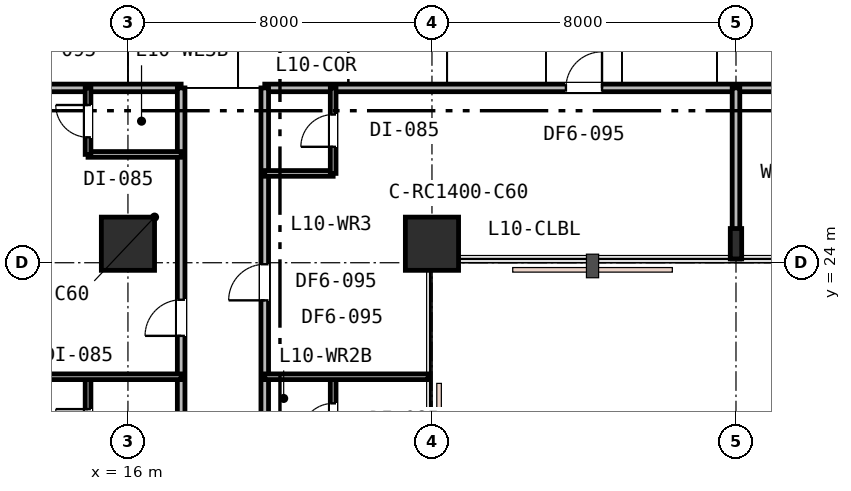
"""IFC4 building model, lengths in metres.
Left out: names, types, materials, properties, quantities, classifications, styles, units other than length and angle.
Written with IfcOpenShell. Run it as: python <this file> out.ifc"""

import sys

from ifc_helpers import new_model, si_unit, direction, frame, frame_2d, origin, origin_2d, place, context, subcontext, project, spatial, rectangle, i_section, extrude, element, fill, save


model = new_model("IFC4")
c1 = context("Model", 3, precision=1e-05, world=origin(), true_north=direction((0.0, 1.0)))
c2 = subcontext(c1, "Body", "Model", "MODEL_VIEW")
j1 = project(units=[si_unit("LENGTHUNIT", "METRE"), si_unit("PLANEANGLEUNIT", "RADIAN")], contexts=[c1])
p1 = place(None, origin())
s1 = spatial("IfcSite", under=j1, at=p1, CompositionType="ELEMENT")
p2 = place(p1, origin())
s2 = spatial("IfcBuilding", under=s1, at=p2, CompositionType="ELEMENT")
p3 = place(p2, frame((0.0, 0.0, 43.8)))
s3 = spatial("IfcBuildingStorey", under=s2, at=p3, CompositionType="ELEMENT", Elevation=43.8)
for number, where, z_axis, x_axis in (
    (1, (16.0, 24.5, 0.0), (0.0, 0.0, 1.0), (1.0, 0.0, 0.0)),
    (2, (24.0, 24.5, 0.0), (0.0, 0.0, 1.0), (1.0, 0.0, 0.0)),
):
    element("IfcColumn", number, at=place(p3, frame(where, z_axis=z_axis, x_axis=x_axis)), inside=s3, PredefinedType="COLUMN", context=c2, shape_type="SweptSolid", body=[
        extrude(rectangle(XDim=1.4, YDim=1.4, at=origin_2d()), origin(), (0.0, 0.0, 1.0), 3.6),
    ])
p4 = place(p3, frame((32.0, 24.5, 0.0), z_axis=(0.0, 0.0, 1.0), x_axis=(1.0, 0.0, 0.0)))
e3 = element("IfcColumn", 3, at=p4, inside=s3, PredefinedType="COLUMN", context=c2, shape_type="SweptSolid", body=[
    extrude(i_section(OverallWidth=0.3, OverallDepth=0.8, WebThickness=0.018, FlangeThickness=0.033, FilletRadius=0.03, at=origin_2d()), origin(), (0.0, 0.0, 1.0), 3.6),
])
p5 = place(p3, frame((0.1, 28.6, 0.0), z_axis=(0.0, 0.0, 1.0), x_axis=(1.0, 0.0, 0.0)))
e4 = element("IfcWall", 4, at=p5, inside=s3, PredefinedType="PARTITIONING", context=c2, shape_type="SweptSolid", body=[
    extrude(rectangle(XDim=17.3, YDim=0.2, at=frame_2d((8.65, 0.0))), origin(), (0.0, 0.0, 1.0), 2.82),
])
p6 = place(p3, frame((19.6, 28.6, 0.0), z_axis=(0.0, 0.0, 1.0), x_axis=(1.0, 0.0, 0.0)))
e5 = element("IfcWall", 5, at=p6, inside=s3, PredefinedType="PARTITIONING", context=c2, shape_type="SweptSolid", body=[
    extrude(rectangle(XDim=30.8, YDim=0.2, at=frame_2d((15.4, 0.0))), origin(), (0.0, 0.0, 1.0), 2.82),
])
p7 = place(p6, frame((7.925, 0.0, 0.0)))
e6 = element("IfcOpeningElement", 6, at=p7, cuts=e5, PredefinedType="OPENING", context=c2, shape_type="SweptSolid", body=[
    extrude(rectangle(XDim=0.95, YDim=2.15, at=frame_2d((0.475, 1.075))), frame((0.0, 0.11, 0.0), z_axis=(0.0, -1.0, 0.0), x_axis=(1.0, 0.0, 0.0)), (0.0, 0.0, 1.0), 0.22),
])
p8 = place(p6, frame((16.39, 0.0, 0.0)))
e7 = element("IfcOpeningElement", 7, at=p8, cuts=e5, PredefinedType="OPENING", context=c2, shape_type="SweptSolid", body=[
    extrude(rectangle(XDim=0.95, YDim=2.15, at=frame_2d((0.475, 1.075))), frame((0.0, 0.11, 0.0), z_axis=(0.0, -1.0, 0.0), x_axis=(1.0, 0.0, 0.0)), (0.0, 0.0, 1.0), 0.22),
])
p9 = place(p6, frame((26.835, 0.0, 0.0)))
e8 = element("IfcOpeningElement", 8, at=p9, cuts=e5, PredefinedType="OPENING", context=c2, shape_type="SweptSolid", body=[
    extrude(rectangle(XDim=0.95, YDim=2.15, at=frame_2d((0.475, 1.075))), frame((0.0, 0.11, 0.0), z_axis=(0.0, -1.0, 0.0), x_axis=(1.0, 0.0, 0.0)), (0.0, 0.0, 1.0), 0.22),
])
p10 = place(p3, frame((32.0, 24.1, 0.0), z_axis=(0.0, 0.0, 1.0), x_axis=(0.0, 1.0, 0.0)))
e9 = element("IfcWall", 9, at=p10, inside=s3, PredefinedType="PARTITIONING", context=c2, shape_type="SweptSolid", body=[
    extrude(rectangle(XDim=4.5, YDim=0.2, at=frame_2d((2.25, 0.0))), origin(), (0.0, 0.0, 1.0), 2.93),
])
p11 = place(p3, frame((17.4, 5.6, 0.0), z_axis=(0.0, 0.0, 1.0), x_axis=(0.0, 1.0, 0.0)))
e10 = element("IfcWall", 10, at=p11, inside=s3, PredefinedType="PARTITIONING", context=c2, shape_type="SweptSolid", body=[
    extrude(rectangle(XDim=23.0, YDim=0.2, at=frame_2d((11.5, 0.0))), origin(), (0.0, 0.0, 1.0), 2.82),
])
p12 = place(p11, frame((0.84, 0.0, 0.0)))
e11 = element("IfcOpeningElement", 11, at=p12, cuts=e10, PredefinedType="OPENING", context=c2, shape_type="SweptSolid", body=[
    extrude(rectangle(XDim=0.95, YDim=2.15, at=frame_2d((0.475, 1.075))), frame((0.0, 0.11, 0.0), z_axis=(0.0, -1.0, 0.0), x_axis=(1.0, 0.0, 0.0)), (0.0, 0.0, 1.0), 0.22),
])
p13 = place(p11, frame((8.983, 0.0, 0.0)))
e12 = element("IfcOpeningElement", 12, at=p13, cuts=e10, PredefinedType="OPENING", context=c2, shape_type="SweptSolid", body=[
    extrude(rectangle(XDim=0.95, YDim=2.15, at=frame_2d((0.475, 1.075))), frame((0.0, 0.11, 0.0), z_axis=(0.0, -1.0, 0.0), x_axis=(1.0, 0.0, 0.0)), (0.0, 0.0, 1.0), 0.22),
])
p14 = place(p11, frame((16.476, 0.0, 0.0)))
e13 = element("IfcOpeningElement", 13, at=p14, cuts=e10, PredefinedType="OPENING", context=c2, shape_type="SweptSolid", body=[
    extrude(rectangle(XDim=0.95, YDim=2.15, at=frame_2d((0.475, 1.075))), frame((0.0, 0.11, 0.0), z_axis=(0.0, -1.0, 0.0), x_axis=(1.0, 0.0, 0.0)), (0.0, 0.0, 1.0), 0.22),
])
p15 = place(p3, frame((19.6, 5.6, 0.0), z_axis=(0.0, 0.0, 1.0), x_axis=(0.0, 1.0, 0.0)))
e14 = element("IfcWall", 14, at=p15, inside=s3, PredefinedType="PARTITIONING", context=c2, shape_type="SweptSolid", body=[
    extrude(rectangle(XDim=23.0, YDim=0.2, at=frame_2d((11.5, 0.0))), origin(), (0.0, 0.0, 1.0), 2.82),
])
p16 = place(p15, frame((2.1, 0.0, 0.0)))
e15 = element("IfcOpeningElement", 15, at=p16, cuts=e14, PredefinedType="OPENING", context=c2, shape_type="SweptSolid", body=[
    extrude(rectangle(XDim=0.95, YDim=2.15, at=frame_2d((0.475, 1.075))), frame((0.0, 0.11, 0.0), z_axis=(0.0, -1.0, 0.0), x_axis=(1.0, 0.0, 0.0)), (0.0, 0.0, 1.0), 0.22),
])
p17 = place(p15, frame((9.81, 0.0, 0.0)))
e16 = element("IfcOpeningElement", 16, at=p17, cuts=e14, PredefinedType="OPENING", context=c2, shape_type="SweptSolid", body=[
    extrude(rectangle(XDim=0.95, YDim=2.15, at=frame_2d((0.475, 1.075))), frame((0.0, 0.11, 0.0), z_axis=(0.0, -1.0, 0.0), x_axis=(1.0, 0.0, 0.0)), (0.0, 0.0, 1.0), 0.22),
])
p18 = place(p15, frame((17.41, 0.0, 0.0)))
e17 = element("IfcOpeningElement", 17, at=p18, cuts=e14, PredefinedType="OPENING", context=c2, shape_type="SweptSolid", body=[
    extrude(rectangle(XDim=0.95, YDim=2.15, at=frame_2d((0.475, 1.075))), frame((0.0, 0.11, 0.0), z_axis=(0.0, -1.0, 0.0), x_axis=(1.0, 0.0, 0.0)), (0.0, 0.0, 1.0), 0.22),
])
p19 = place(p3, frame((14.95, 16.0, 0.0), z_axis=(0.0, 0.0, 1.0), x_axis=(0.0, 1.0, 0.0)))
e18 = element("IfcWall", 18, at=p19, inside=s3, PredefinedType="PARTITIONING", context=c2, shape_type="SweptSolid", body=[
    extrude(rectangle(XDim=5.0, YDim=0.15, at=frame_2d((2.5, 0.0))), origin(), (0.0, 0.0, 1.0), 2.82),
])
p20 = place(p19, frame((3.298, 0.0, 0.0)))
e19 = element("IfcOpeningElement", 19, at=p20, cuts=e18, PredefinedType="OPENING", context=c2, shape_type="SweptSolid", body=[
    extrude(rectangle(XDim=0.85, YDim=2.15, at=frame_2d((0.425, 1.075))), frame((0.0, 0.085, 0.0), z_axis=(0.0, -1.0, 0.0), x_axis=(1.0, 0.0, 0.0)), (0.0, 0.0, 1.0), 0.17),
])
p21 = place(p3, frame((0.1, 21.0, 0.0), z_axis=(0.0, 0.0, 1.0), x_axis=(1.0, 0.0, 0.0)))
e20 = element("IfcWall", 20, at=p21, inside=s3, PredefinedType="PARTITIONING", context=c2, shape_type="SweptSolid", body=[
    extrude(rectangle(XDim=17.3, YDim=0.15, at=frame_2d((8.65, 0.0))), origin(), (0.0, 0.0, 1.0), 2.82),
])
p22 = place(p3, frame((21.4, 18.75, 0.0), z_axis=(0.0, 0.0, 1.0), x_axis=(0.0, 1.0, 0.0)))
e21 = element("IfcWall", 21, at=p22, inside=s3, PredefinedType="PARTITIONING", context=c2, shape_type="SweptSolid", body=[
    extrude(rectangle(XDim=2.25, YDim=0.15, at=frame_2d((1.125, 0.0))), origin(), (0.0, 0.0, 1.0), 3.33),
])
p23 = place(p22, frame((0.7, 0.0, 0.0)))
e22 = element("IfcOpeningElement", 22, at=p23, cuts=e21, PredefinedType="OPENING", context=c2, shape_type="SweptSolid", body=[
    extrude(rectangle(XDim=0.85, YDim=2.15, at=frame_2d((0.425, 1.075))), frame((0.0, 0.085, 0.0), z_axis=(0.0, -1.0, 0.0), x_axis=(1.0, 0.0, 0.0)), (0.0, 0.0, 1.0), 0.17),
])
p24 = place(p3, frame((19.6, 21.0, 0.0), z_axis=(0.0, 0.0, 1.0), x_axis=(1.0, 0.0, 0.0)))
e23 = element("IfcWall", 23, at=p24, inside=s3, PredefinedType="PARTITIONING", context=c2, shape_type="SweptSolid", body=[
    extrude(rectangle(XDim=4.3, YDim=0.15, at=frame_2d((2.15, 0.0))), origin(), (0.0, 0.0, 1.0), 3.33),
])
p25 = place(p3, frame((14.95, 26.85, 0.0), z_axis=(0.0, 0.0, 1.0), x_axis=(1.0, 0.0, 0.0)))
e24 = element("IfcWall", 24, at=p25, inside=s3, PredefinedType="PARTITIONING", context=c2, shape_type="SweptSolid", body=[
    extrude(rectangle(XDim=2.45, YDim=0.15, at=frame_2d((1.225, 0.0))), origin(), (0.0, 0.0, 1.0), 2.82),
])
p26 = place(p3, frame((14.95, 26.85, 0.0), z_axis=(0.0, 0.0, 1.0), x_axis=(0.0, 1.0, 0.0)))
e25 = element("IfcWall", 25, at=p26, inside=s3, PredefinedType="PARTITIONING", context=c2, shape_type="SweptSolid", body=[
    extrude(rectangle(XDim=1.75, YDim=0.15, at=frame_2d((0.875, 0.0))), origin(), (0.0, 0.0, 1.0), 3.33),
])
p27 = place(p26, frame((0.45, 0.0, 0.0)))
e26 = element("IfcOpeningElement", 26, at=p27, cuts=e25, PredefinedType="OPENING", context=c2, shape_type="SweptSolid", body=[
    extrude(rectangle(XDim=0.85, YDim=2.15, at=frame_2d((0.425, 1.075))), frame((0.0, 0.085, 0.0), z_axis=(0.0, -1.0, 0.0), x_axis=(1.0, 0.0, 0.0)), (0.0, 0.0, 1.0), 0.17),
])
p28 = place(p3, frame((19.6, 26.35, 0.0), z_axis=(0.0, 0.0, 1.0), x_axis=(1.0, 0.0, 0.0)))
e27 = element("IfcWall", 27, at=p28, inside=s3, PredefinedType="PARTITIONING", context=c2, shape_type="SweptSolid", body=[
    extrude(rectangle(XDim=1.8, YDim=0.15, at=frame_2d((0.9, 0.0))), origin(), (0.0, 0.0, 1.0), 2.96),
])
p29 = place(p3, frame((21.4, 26.35, 0.0), z_axis=(0.0, 0.0, 1.0), x_axis=(0.0, 1.0, 0.0)))
e28 = element("IfcWall", 28, at=p29, inside=s3, PredefinedType="PARTITIONING", context=c2, shape_type="SweptSolid", body=[
    extrude(rectangle(XDim=2.25, YDim=0.15, at=frame_2d((1.125, 0.0))), origin(), (0.0, 0.0, 1.0), 2.96),
])
p30 = place(p29, frame((0.7, 0.0, 0.0)))
e29 = element("IfcOpeningElement", 29, at=p30, cuts=e28, PredefinedType="OPENING", context=c2, shape_type="SweptSolid", body=[
    extrude(rectangle(XDim=0.85, YDim=2.15, at=frame_2d((0.425, 1.075))), frame((0.0, 0.085, 0.0), z_axis=(0.0, -1.0, 0.0), x_axis=(1.0, 0.0, 0.0)), (0.0, 0.0, 1.0), 0.17),
])
p31 = place(p7, origin())
e30 = element("IfcDoor", 30, at=p31, inside=s3, OperationType="SINGLE_SWING_RIGHT", PredefinedType="DOOR", context=c2, shape_type="SweptSolid", body=[
    extrude(rectangle(XDim=0.95, YDim=2.15, at=frame_2d((0.475, 1.075))), frame((0.0, 0.025, 0.0), z_axis=(0.0, -1.0, 0.0), x_axis=(1.0, 0.0, 0.0)), (0.0, 0.0, 1.0), 0.05),
])
fill(e6, e30)
p32 = place(p20, origin())
e31 = element("IfcDoor", 31, at=p32, inside=s3, OperationType="SINGLE_SWING_RIGHT", PredefinedType="DOOR", context=c2, shape_type="SweptSolid", body=[
    extrude(rectangle(XDim=0.85, YDim=2.15, at=frame_2d((0.425, 1.075))), frame((0.0, 0.025, 0.0), z_axis=(0.0, -1.0, 0.0), x_axis=(1.0, 0.0, 0.0)), (0.0, 0.0, 1.0), 0.05),
])
fill(e19, e31)
p33 = place(p23, origin())
e32 = element("IfcDoor", 32, at=p33, inside=s3, OperationType="SINGLE_SWING_LEFT", PredefinedType="DOOR", context=c2, shape_type="SweptSolid", body=[
    extrude(rectangle(XDim=0.85, YDim=2.15, at=frame_2d((0.425, 1.075))), frame((0.0, 0.025, 0.0), z_axis=(0.0, -1.0, 0.0), x_axis=(1.0, 0.0, 0.0)), (0.0, 0.0, 1.0), 0.05),
])
fill(e22, e32)
p34 = place(p14, origin())
e33 = element("IfcDoor", 33, at=p34, inside=s3, OperationType="SINGLE_SWING_LEFT", PredefinedType="DOOR", context=c2, shape_type="SweptSolid", body=[
    extrude(rectangle(XDim=0.95, YDim=2.15, at=frame_2d((0.475, 1.075))), frame((0.0, 0.025, 0.0), z_axis=(0.0, -1.0, 0.0), x_axis=(1.0, 0.0, 0.0)), (0.0, 0.0, 1.0), 0.05),
])
fill(e13, e33)
p35 = place(p27, origin())
e34 = element("IfcDoor", 34, at=p35, inside=s3, OperationType="SINGLE_SWING_RIGHT", PredefinedType="DOOR", context=c2, shape_type="SweptSolid", body=[
    extrude(rectangle(XDim=0.85, YDim=2.15, at=frame_2d((0.425, 1.075))), frame((0.0, 0.025, 0.0), z_axis=(0.0, -1.0, 0.0), x_axis=(1.0, 0.0, 0.0)), (0.0, 0.0, 1.0), 0.05),
])
fill(e26, e34)
p36 = place(p18, origin())
e35 = element("IfcDoor", 35, at=p36, inside=s3, OperationType="SINGLE_SWING_LEFT", PredefinedType="DOOR", context=c2, shape_type="SweptSolid", body=[
    extrude(rectangle(XDim=0.95, YDim=2.15, at=frame_2d((0.475, 1.075))), frame((0.0, 0.025, 0.0), z_axis=(0.0, -1.0, 0.0), x_axis=(1.0, 0.0, 0.0)), (0.0, 0.0, 1.0), 0.05),
])
fill(e17, e35)
p37 = place(p30, origin())
e36 = element("IfcDoor", 36, at=p37, inside=s3, OperationType="SINGLE_SWING_LEFT", PredefinedType="DOOR", context=c2, shape_type="SweptSolid", body=[
    extrude(rectangle(XDim=0.85, YDim=2.15, at=frame_2d((0.425, 1.075))), frame((0.0, 0.025, 0.0), z_axis=(0.0, -1.0, 0.0), x_axis=(1.0, 0.0, 0.0)), (0.0, 0.0, 1.0), 0.05),
])
fill(e29, e36)
save(model, sys.argv[1])
